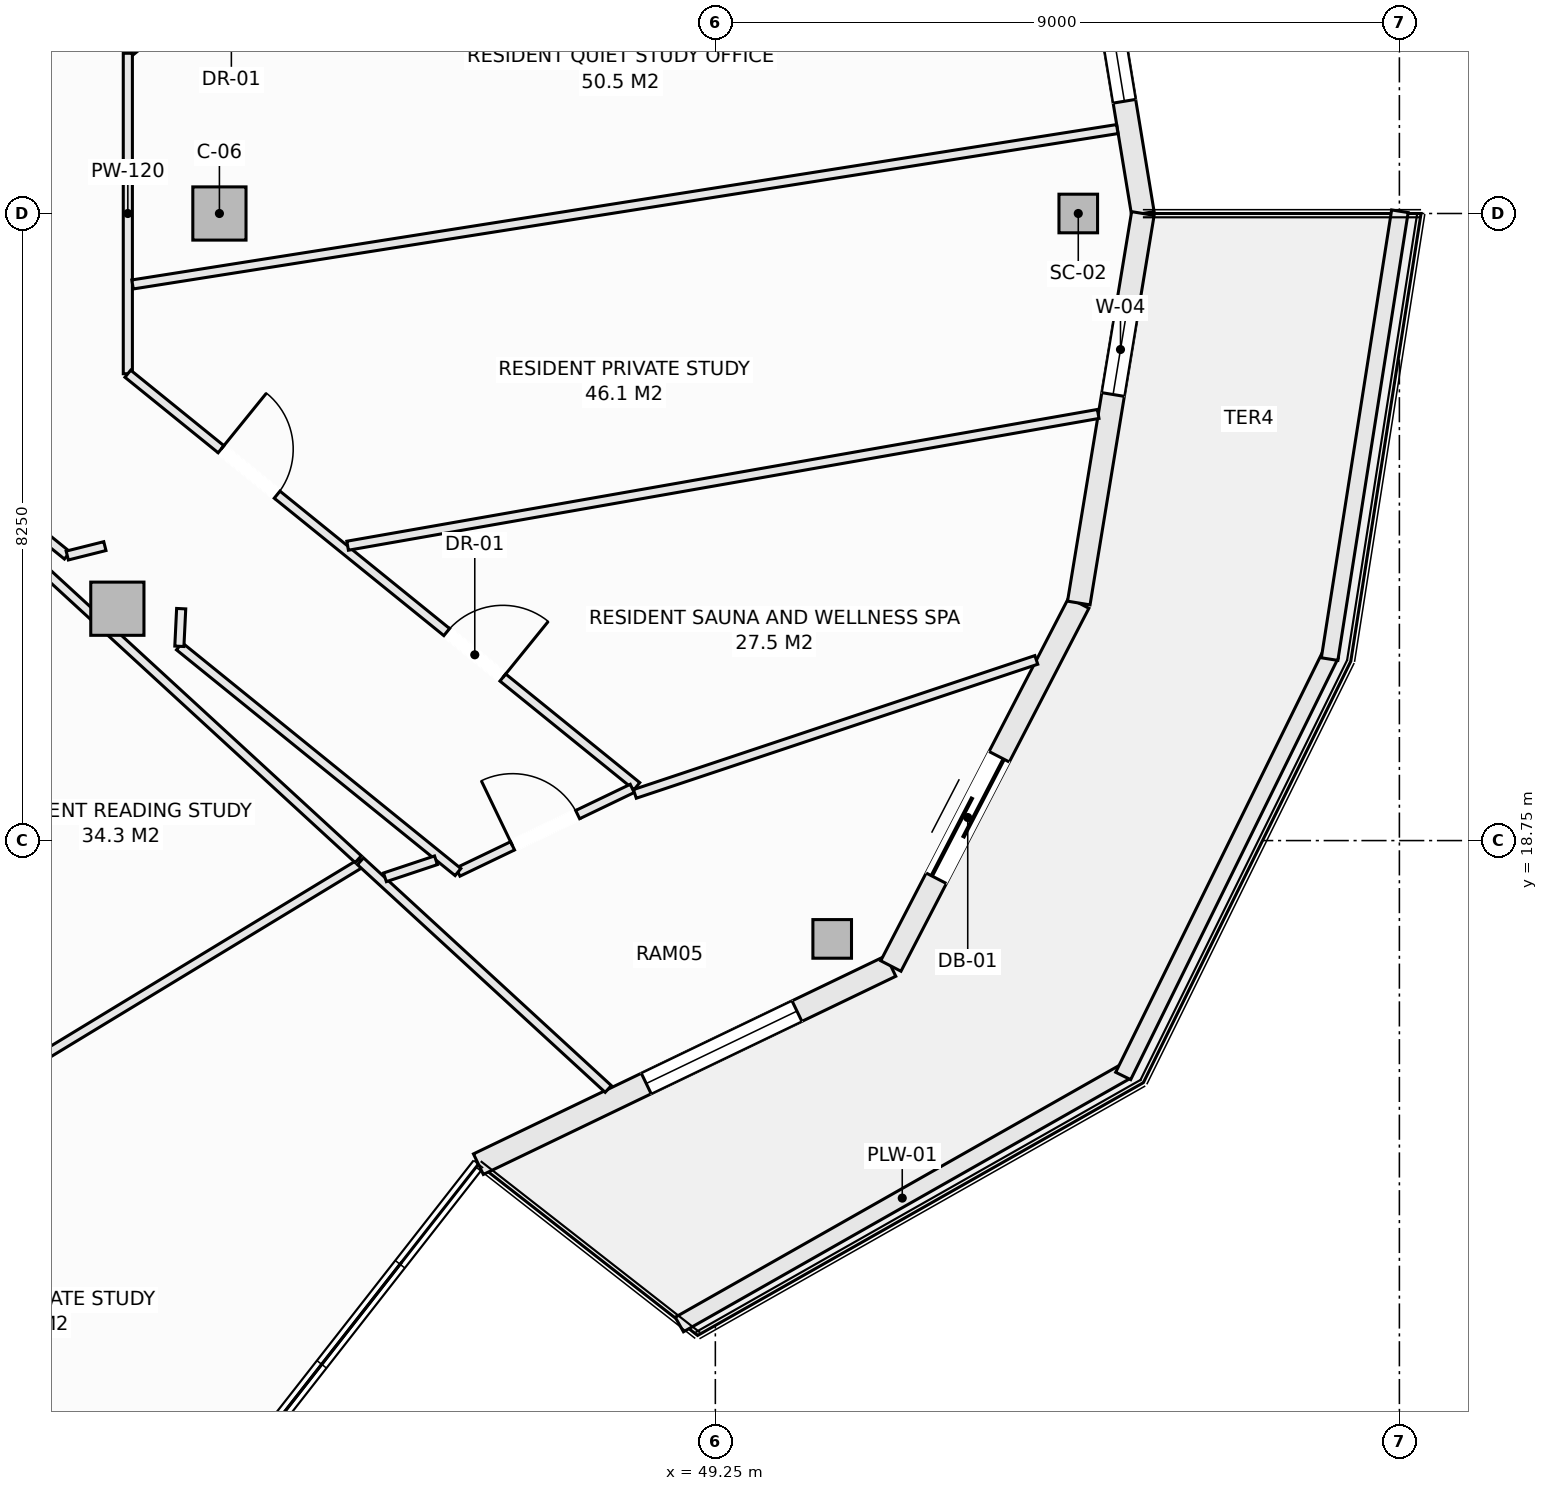
"""IFC4 building model, lengths in metres.
Left out: names, types, materials, properties, quantities, classifications, styles, units other than length and angle.
Written with IfcOpenShell. Run it as: python <this file> out.ifc"""

import sys

from ifc_helpers import new_model, si_unit, direction, frame, frame_2d, origin, origin_2d, place, context, subcontext, project, spatial, rectangle, hollow_rectangle, extrude, element, fill, save


model = new_model("IFC4")
c1 = context("Model", 3, precision=1e-05, world=origin(), true_north=direction((0.0, 1.0)))
c2 = subcontext(c1, "Body", "Model", "MODEL_VIEW")
j1 = project(units=[si_unit("LENGTHUNIT", "METRE"), si_unit("PLANEANGLEUNIT", "RADIAN")], contexts=[c1])
p1 = place(None, origin())
s1 = spatial("IfcSite", under=j1, at=p1, CompositionType="ELEMENT")
p2 = place(p1, origin())
s2 = spatial("IfcBuilding", under=s1, at=p2, CompositionType="ELEMENT")
p3 = place(p2, frame((0.0, 0.0, 219.5)))
s3 = spatial("IfcBuildingStorey", under=s2, at=p3, CompositionType="ELEMENT", Elevation=219.5)
for number, where, z_axis, x_axis in (
    (1, (54.025, 27.0, -0.27), (0.0, 0.0, 1.0), (1.0, 0.0, 0.0)),
    (2, (50.787, 17.456, -0.27), (0.0, 0.0, 1.0), (1.0, 0.0, 0.0)),
):
    element("IfcColumn", number, at=place(p3, frame(where, z_axis=z_axis, x_axis=x_axis)), inside=s3, PredefinedType="COLUMN", context=c2, shape_type="SweptSolid", body=[
        extrude(hollow_rectangle(XDim=0.508, YDim=0.508, WallThickness=0.019, at=origin_2d()), origin(), (0.0, 0.0, 1.0), 3.3),
    ])
for number, where, z_axis, x_axis in (
    (3, (42.725, 27.0, -0.27), (0.0, 0.0, 1.0), (1.0, 0.0, 0.0)),
    (4, (41.382, 21.801, -0.27), (0.0, 0.0, 1.0), (1.0, 0.0, 0.0)),
):
    element("IfcColumn", number, at=place(p3, frame(where, z_axis=z_axis, x_axis=x_axis)), inside=s3, PredefinedType="COLUMN", context=c2, shape_type="SweptSolid", body=[
        extrude(rectangle(XDim=0.7, YDim=0.7, at=origin_2d()), origin(), (0.0, 0.0, 1.0), 3.3),
    ])
p4 = place(p3, frame((54.032, 32.125, 0.0), z_axis=(0.0, 0.0, 1.0), x_axis=(0.16237087798, -0.986729799886, 0.0)))
e5 = element("IfcWall", 5, at=p4, inside=s3, PredefinedType="SOLIDWALL", context=c2, shape_type="SweptSolid", body=[
    extrude(rectangle(XDim=5.193, YDim=0.3, at=frame_2d((2.597, 0.0))), origin(), (0.0, 0.0, 1.0), 2.605),
])
p5 = place(p4, frame((1.497, 0.0, 0.72)))
e6 = element("IfcOpeningElement", 6, at=p5, cuts=e5, PredefinedType="OPENING", context=c2, shape_type="SweptSolid", body=[
    extrude(rectangle(XDim=2.2, YDim=1.65, at=frame_2d((1.1, 0.825))), frame((0.0, 0.16, 0.0), z_axis=(0.0, -1.0, 0.0), x_axis=(1.0, 0.0, 0.0)), (0.0, 0.0, 1.0), 0.32),
])
p6 = place(p3, frame((46.133, 14.493, 0.0), z_axis=(0.0, 0.0, 1.0), x_axis=(0.901348331142, 0.433094892545, 0.0)))
e7 = element("IfcWall", 7, at=p6, inside=s3, PredefinedType="SOLIDWALL", context=c2, shape_type="SweptSolid", body=[
    extrude(rectangle(XDim=6.021, YDim=0.3, at=frame_2d((3.01, 0.0))), origin(), (0.0, 0.0, 1.0), 2.605),
])
p7 = place(p6, frame((2.45, 0.0, 0.72)))
e8 = element("IfcOpeningElement", 8, at=p7, cuts=e7, PredefinedType="OPENING", context=c2, shape_type="SweptSolid", body=[
    extrude(rectangle(XDim=2.2, YDim=1.65, at=frame_2d((1.1, 0.825))), frame((0.0, 0.16, 0.0), z_axis=(0.0, -1.0, 0.0), x_axis=(1.0, 0.0, 0.0)), (0.0, 0.0, 1.0), 0.32),
])
p8 = place(p3, frame((51.559, 17.1, 0.0), z_axis=(0.0, 0.0, 1.0), x_axis=(0.459808219482, 0.888018243786, 0.0)))
e9 = element("IfcWall", 9, at=p8, inside=s3, PredefinedType="SOLIDWALL", context=c2, shape_type="SweptSolid", body=[
    extrude(rectangle(XDim=5.378, YDim=0.3, at=frame_2d((2.689, 0.0))), origin(), (0.0, 0.0, 1.0), 2.605),
])
p9 = place(p8, frame((1.3, 0.0, 0.0)))
e10 = element("IfcOpeningElement", 10, at=p9, cuts=e9, PredefinedType="OPENING", context=c2, shape_type="SweptSolid", body=[
    extrude(rectangle(XDim=1.8, YDim=2.25, at=frame_2d((0.9, 1.125))), frame((0.0, 0.16, 0.0), z_axis=(0.0, -1.0, 0.0), x_axis=(1.0, 0.0, 0.0)), (0.0, 0.0, 1.0), 0.32),
])
p10 = place(p3, frame((54.032, 21.875, 0.0), z_axis=(0.0, 0.0, 1.0), x_axis=(0.16237087798, 0.986729799886, 0.0)))
e11 = element("IfcWall", 11, at=p10, inside=s3, PredefinedType="SOLIDWALL", context=c2, shape_type="SweptSolid", body=[
    extrude(rectangle(XDim=5.193, YDim=0.3, at=frame_2d((2.597, 0.0))), origin(), (0.0, 0.0, 1.0), 2.605),
])
p11 = place(p10, frame((2.78, 0.0, 0.72)))
e12 = element("IfcOpeningElement", 12, at=p11, cuts=e11, PredefinedType="OPENING", context=c2, shape_type="SweptSolid", body=[
    extrude(rectangle(XDim=1.2, YDim=1.65, at=frame_2d((0.6, 0.825))), frame((0.0, 0.16, 0.0), z_axis=(0.0, -1.0, 0.0), x_axis=(1.0, 0.0, 0.0)), (0.0, 0.0, 1.0), 0.32),
])
p12 = place(p3, frame((48.776, 12.383, 0.0), z_axis=(0.0, 0.0, 1.0), x_axis=(0.869860619267, 0.493297580623, 0.0)))
e13 = element("IfcWall", 13, at=p12, inside=s3, PredefinedType="PARAPET", context=c2, shape_type="SweptSolid", body=[
    extrude(rectangle(XDim=6.743, YDim=0.22, at=frame_2d((3.371, 0.0))), origin(), (0.0, 0.0, 1.0), 0.52),
])
p13 = place(p3, frame((54.616, 15.653, 0.0), z_axis=(0.0, 0.0, 1.0), x_axis=(0.441640961804, 0.897191875162, 0.0)))
e14 = element("IfcWall", 14, at=p13, inside=s3, PredefinedType="PARAPET", context=c2, shape_type="SweptSolid", body=[
    extrude(rectangle(XDim=6.178, YDim=0.22, at=frame_2d((3.089, 0.0))), origin(), (0.0, 0.0, 1.0), 0.52),
])
p14 = place(p3, frame((57.332, 21.138, 0.0), z_axis=(0.0, 0.0, 1.0), x_axis=(0.1550711793, 0.987903299595, 0.0)))
e15 = element("IfcWall", 15, at=p14, inside=s3, PredefinedType="PARAPET", context=c2, shape_type="SweptSolid", body=[
    extrude(rectangle(XDim=5.964, YDim=0.22, at=frame_2d((2.982, 0.0))), origin(), (0.0, 0.0, 1.0), 0.52),
])
p15 = place(p3, frame((41.52, 29.108, 0.0), z_axis=(0.0, 0.0, 1.0), x_axis=(0.777032738693, 0.629460183808, 0.0)))
e16 = element("IfcWall", 16, at=p15, inside=s3, PredefinedType="PARTITIONING", context=c2, shape_type="SweptSolid", body=[
    extrude(rectangle(XDim=8.552, YDim=0.12, at=frame_2d((4.276, 0.0))), origin(), (0.0, 0.0, 1.0), 3.03),
])
p16 = place(p15, frame((1.278, 0.0, 0.0)))
e17 = element("IfcOpeningElement", 17, at=p16, cuts=e16, PredefinedType="OPENING", context=c2, shape_type="SweptSolid", body=[
    extrude(rectangle(XDim=0.95, YDim=2.1, at=frame_2d((0.475, 1.05))), frame((0.0, 0.07, 0.0), z_axis=(0.0, -1.0, 0.0), x_axis=(1.0, 0.0, 0.0)), (0.0, 0.0, 1.0), 0.14),
])
p17 = place(p15, frame((4.977, 0.0, 0.0)))
e18 = element("IfcOpeningElement", 18, at=p17, cuts=e16, PredefinedType="OPENING", context=c2, shape_type="SweptSolid", body=[
    extrude(rectangle(XDim=0.95, YDim=2.1, at=frame_2d((0.475, 1.05))), frame((0.0, 0.07, 0.0), z_axis=(0.0, -1.0, 0.0), x_axis=(1.0, 0.0, 0.0)), (0.0, 0.0, 1.0), 0.14),
])
p18 = place(p3, frame((41.52, 24.892, 0.0), z_axis=(0.0, 0.0, 1.0), x_axis=(0.0, 1.0, 0.0)))
e19 = element("IfcWall", 19, at=p18, inside=s3, PredefinedType="PARTITIONING", context=c2, shape_type="SweptSolid", body=[
    extrude(rectangle(XDim=4.216, YDim=0.12, at=frame_2d((2.108, 0.0))), origin(), (0.0, 0.0, 1.0), 3.03),
])
p19 = place(p3, frame((41.52, 24.892, 0.0), z_axis=(0.0, 0.0, 1.0), x_axis=(0.777027167904, -0.629467060567, 0.0)))
e20 = element("IfcWall", 20, at=p19, inside=s3, PredefinedType="PARTITIONING", context=c2, shape_type="SweptSolid", body=[
    extrude(rectangle(XDim=8.62, YDim=0.12, at=frame_2d((4.31, 0.0))), origin(), (0.0, 0.0, 1.0), 2.77),
])
p20 = place(p19, frame((5.4, 0.0, 0.0)))
e21 = element("IfcOpeningElement", 21, at=p20, cuts=e20, PredefinedType="OPENING", context=c2, shape_type="SweptSolid", body=[
    extrude(rectangle(XDim=0.95, YDim=2.1, at=frame_2d((0.475, 1.05))), frame((0.0, 0.07, 0.0), z_axis=(0.0, -1.0, 0.0), x_axis=(1.0, 0.0, 0.0)), (0.0, 0.0, 1.0), 0.14),
])
p21 = place(p19, frame((1.578, 0.0, 0.0)))
e22 = element("IfcOpeningElement", 22, at=p21, cuts=e20, PredefinedType="OPENING", context=c2, shape_type="SweptSolid", body=[
    extrude(rectangle(XDim=0.95, YDim=2.1, at=frame_2d((0.475, 1.05))), frame((0.0, 0.07, 0.0), z_axis=(0.0, -1.0, 0.0), x_axis=(1.0, 0.0, 0.0)), (0.0, 0.0, 1.0), 0.14),
])
p22 = place(p3, frame((45.864, 18.336, 0.0), z_axis=(0.0, 0.0, 1.0), x_axis=(0.901512568896, 0.432752918097, 0.0)))
e23 = element("IfcWall", 23, at=p22, inside=s3, PredefinedType="PARTITIONING", context=c2, shape_type="SweptSolid", body=[
    extrude(rectangle(XDim=2.543, YDim=0.12, at=frame_2d((1.271, 0.0))), origin(), (0.0, 0.0, 1.0), 3.03),
])
p23 = place(p22, frame((0.796, 0.0, 0.0)))
e24 = element("IfcOpeningElement", 24, at=p23, cuts=e23, PredefinedType="OPENING", context=c2, shape_type="SweptSolid", body=[
    extrude(rectangle(XDim=0.95, YDim=2.1, at=frame_2d((0.475, 1.05))), frame((0.0, 0.07, 0.0), z_axis=(0.0, -1.0, 0.0), x_axis=(1.0, 0.0, 0.0)), (0.0, 0.0, 1.0), 0.14),
])
p24 = place(p3, frame((40.082, 23.02, 0.0), z_axis=(0.0, 0.0, 1.0), x_axis=(0.776900403314, -0.629623509195, 0.0)))
e25 = element("IfcWall", 25, at=p24, inside=s3, PredefinedType="PARTITIONING", context=c2, shape_type="SweptSolid", body=[
    extrude(rectangle(XDim=0.825, YDim=0.12, at=frame_2d((0.413, 0.0))), origin(), (0.0, 0.0, 1.0), 3.03),
])
p25 = place(p3, frame((42.198, 21.306, 0.0), z_axis=(0.0, 0.0, 1.0), x_axis=(0.777012245854, -0.629485480208, 0.0)))
e26 = element("IfcWall", 26, at=p25, inside=s3, PredefinedType="PARTITIONING", context=c2, shape_type="SweptSolid", body=[
    extrude(rectangle(XDim=4.718, YDim=0.12, at=frame_2d((2.359, 0.0))), origin(), (0.0, 0.0, 1.0), 2.77),
])
p26 = place(p3, frame((42.198, 21.306, 0.0), z_axis=(0.0, 0.0, 1.0), x_axis=(0.048267148556, 0.998834461946, 0.0)))
e27 = element("IfcWall", 27, at=p26, inside=s3, PredefinedType="PARTITIONING", context=c2, shape_type="SweptSolid", body=[
    extrude(rectangle(XDim=0.496, YDim=0.12, at=frame_2d((0.248, 0.0))), origin(), (0.0, 0.0, 1.0), 3.03),
])
p27 = place(p3, frame((40.723, 22.5, 0.0), z_axis=(0.0, 0.0, 1.0), x_axis=(0.970029850173, 0.24298578101, 0.0)))
e28 = element("IfcWall", 28, at=p27, inside=s3, PredefinedType="PARTITIONING", context=c2, shape_type="SweptSolid", body=[
    extrude(rectangle(XDim=0.51, YDim=0.12, at=frame_2d((0.255, 0.0))), origin(), (0.0, 0.0, 1.0), 3.03),
])
p28 = place(p3, frame((41.582, 26.066, 0.0), z_axis=(0.0, 0.0, 1.0), x_axis=(0.987780616659, 0.155850740621, 0.0)))
e29 = element("IfcWall", 29, at=p28, inside=s3, PredefinedType="PARTITIONING", context=c2, shape_type="SweptSolid", body=[
    extrude(rectangle(XDim=13.116, YDim=0.12, at=frame_2d((6.558, 0.0))), origin(), (0.0, 0.0, 1.0), 2.478),
])
p29 = place(p3, frame((32.753, 11.628, 0.0), z_axis=(0.0, 0.0, 1.0), x_axis=(0.96314203236, -0.26899335587, 0.0)))
e30 = element("IfcWall", 30, at=p29, inside=s3, PredefinedType="PARTITIONING", context=c2, shape_type="SweptSolid", body=[
    extrude(rectangle(XDim=8.238, YDim=0.12, at=frame_2d((4.119, 0.0))), origin(), (0.0, 0.0, 1.0), 2.605),
])
p30 = place(p3, frame((36.012, 13.247, 0.0), z_axis=(0.0, 0.0, 1.0), x_axis=(0.85474937032, 0.519040955934, 0.0)))
e31 = element("IfcWall", 31, at=p30, inside=s3, PredefinedType="PARTITIONING", context=c2, shape_type="SweptSolid", body=[
    extrude(rectangle(XDim=10.04, YDim=0.12, at=frame_2d((5.02, 0.0))), origin(), (0.0, 0.0, 1.0), 3.03),
])
p31 = place(p3, frame((39.706, 22.958, 0.0), z_axis=(0.0, 0.0, 1.0), x_axis=(0.73633751064, -0.676614417837, 0.0)))
e32 = element("IfcWall", 32, at=p31, inside=s3, PredefinedType="PARTITIONING", context=c2, shape_type="SweptSolid", body=[
    extrude(rectangle(XDim=6.582, YDim=0.12, at=frame_2d((3.291, 0.0))), origin(), (0.0, 0.0, 1.0), 3.03),
])
p32 = place(p3, frame((44.581, 18.478, 0.0), z_axis=(0.0, 0.0, 1.0), x_axis=(0.736361674887, -0.676588119729, 0.0)))
e33 = element("IfcWall", 33, at=p32, inside=s3, PredefinedType="PARTITIONING", context=c2, shape_type="SweptSolid", body=[
    extrude(rectangle(XDim=4.427, YDim=0.12, at=frame_2d((2.214, 0.0))), origin(), (0.0, 0.0, 1.0), 3.03),
])
p33 = place(p3, frame((44.903, 18.267, 0.0), z_axis=(0.0, 0.0, 1.0), x_axis=(0.948614335511, 0.316434578488, 0.0)))
e34 = element("IfcWall", 34, at=p33, inside=s3, PredefinedType="PARTITIONING", context=c2, shape_type="SweptSolid", body=[
    extrude(rectangle(XDim=0.708, YDim=0.12, at=frame_2d((0.354, 0.0))), origin(), (0.0, 0.0, 1.0), 3.03),
])
p34 = place(p3, frame((48.191, 19.364, 0.0), z_axis=(0.0, 0.0, 1.0), x_axis=(0.948573630056, 0.316556580033, 0.0)))
e35 = element("IfcWall", 35, at=p34, inside=s3, PredefinedType="PARTITIONING", context=c2, shape_type="SweptSolid", body=[
    extrude(rectangle(XDim=5.568, YDim=0.12, at=frame_2d((2.784, 0.0))), origin(), (0.0, 0.0, 1.0), 3.03),
])
p35 = place(p3, frame((44.412, 22.629, 0.0), z_axis=(0.0, 0.0, 1.0), x_axis=(0.984937605234, 0.172910132136, 0.0)))
e36 = element("IfcWall", 36, at=p35, inside=s3, PredefinedType="PARTITIONING", context=c2, shape_type="SweptSolid", body=[
    extrude(rectangle(XDim=10.026, YDim=0.12, at=frame_2d((5.013, 0.0))), origin(), (0.0, 0.0, 1.0), 2.77),
])
p36 = place(p5, origin())
e37 = element("IfcWindow", 37, at=p36, inside=s3, PartitioningType="SINGLE_PANEL", PredefinedType="WINDOW", context=c2, shape_type="SweptSolid", body=[
    extrude(rectangle(XDim=2.2, YDim=1.65, at=frame_2d((1.1, 0.825))), frame((0.0, 0.03, 0.0), z_axis=(0.0, -1.0, 0.0), x_axis=(1.0, 0.0, 0.0)), (0.0, 0.0, 1.0), 0.06),
])
fill(e6, e37)
p37 = place(p7, origin())
e38 = element("IfcWindow", 38, at=p37, inside=s3, PartitioningType="SINGLE_PANEL", PredefinedType="WINDOW", context=c2, shape_type="SweptSolid", body=[
    extrude(rectangle(XDim=2.2, YDim=1.65, at=frame_2d((1.1, 0.825))), frame((0.0, 0.03, 0.0), z_axis=(0.0, -1.0, 0.0), x_axis=(1.0, 0.0, 0.0)), (0.0, 0.0, 1.0), 0.06),
])
fill(e8, e38)
p38 = place(p9, frame((1.8, 0.0, 0.0), z_axis=(0.0, 0.0, 1.0), x_axis=(-1.0, 0.0, 0.0)))
e39 = element("IfcDoor", 39, at=p38, inside=s3, OperationType="SLIDING_TO_LEFT", PredefinedType="DOOR", context=c2, shape_type="SweptSolid", body=[
    extrude(rectangle(XDim=1.8, YDim=2.25, at=frame_2d((0.9, 1.125))), frame((0.0, 0.025, 0.0), z_axis=(0.0, -1.0, 0.0), x_axis=(1.0, 0.0, 0.0)), (0.0, 0.0, 1.0), 0.05),
])
fill(e10, e39)
p39 = place(p11, origin())
e40 = element("IfcWindow", 40, at=p39, inside=s3, PartitioningType="SINGLE_PANEL", PredefinedType="WINDOW", context=c2, shape_type="SweptSolid", body=[
    extrude(rectangle(XDim=1.2, YDim=1.65, at=frame_2d((0.6, 0.825))), frame((0.0, 0.03, 0.0), z_axis=(0.0, -1.0, 0.0), x_axis=(1.0, 0.0, 0.0)), (0.0, 0.0, 1.0), 0.06),
])
fill(e12, e40)
p40 = place(p23, origin())
e41 = element("IfcDoor", 41, at=p40, inside=s3, OperationType="SINGLE_SWING_LEFT", PredefinedType="DOOR", context=c2, shape_type="SweptSolid", body=[
    extrude(rectangle(XDim=0.95, YDim=2.1, at=frame_2d((0.475, 1.05))), frame((0.0, 0.025, 0.0), z_axis=(0.0, -1.0, 0.0), x_axis=(1.0, 0.0, 0.0)), (0.0, 0.0, 1.0), 0.05),
])
fill(e24, e41)
p41 = place(p20, origin())
e42 = element("IfcDoor", 42, at=p41, inside=s3, OperationType="SINGLE_SWING_RIGHT", PredefinedType="DOOR", context=c2, shape_type="SweptSolid", body=[
    extrude(rectangle(XDim=0.95, YDim=2.1, at=frame_2d((0.475, 1.05))), frame((0.0, 0.025, 0.0), z_axis=(0.0, -1.0, 0.0), x_axis=(1.0, 0.0, 0.0)), (0.0, 0.0, 1.0), 0.05),
])
fill(e21, e42)
p42 = place(p21, origin())
e43 = element("IfcDoor", 43, at=p42, inside=s3, OperationType="SINGLE_SWING_LEFT", PredefinedType="DOOR", context=c2, shape_type="SweptSolid", body=[
    extrude(rectangle(XDim=0.95, YDim=2.1, at=frame_2d((0.475, 1.05))), frame((0.0, 0.025, 0.0), z_axis=(0.0, -1.0, 0.0), x_axis=(1.0, 0.0, 0.0)), (0.0, 0.0, 1.0), 0.05),
])
fill(e22, e43)
save(model, sys.argv[1])
